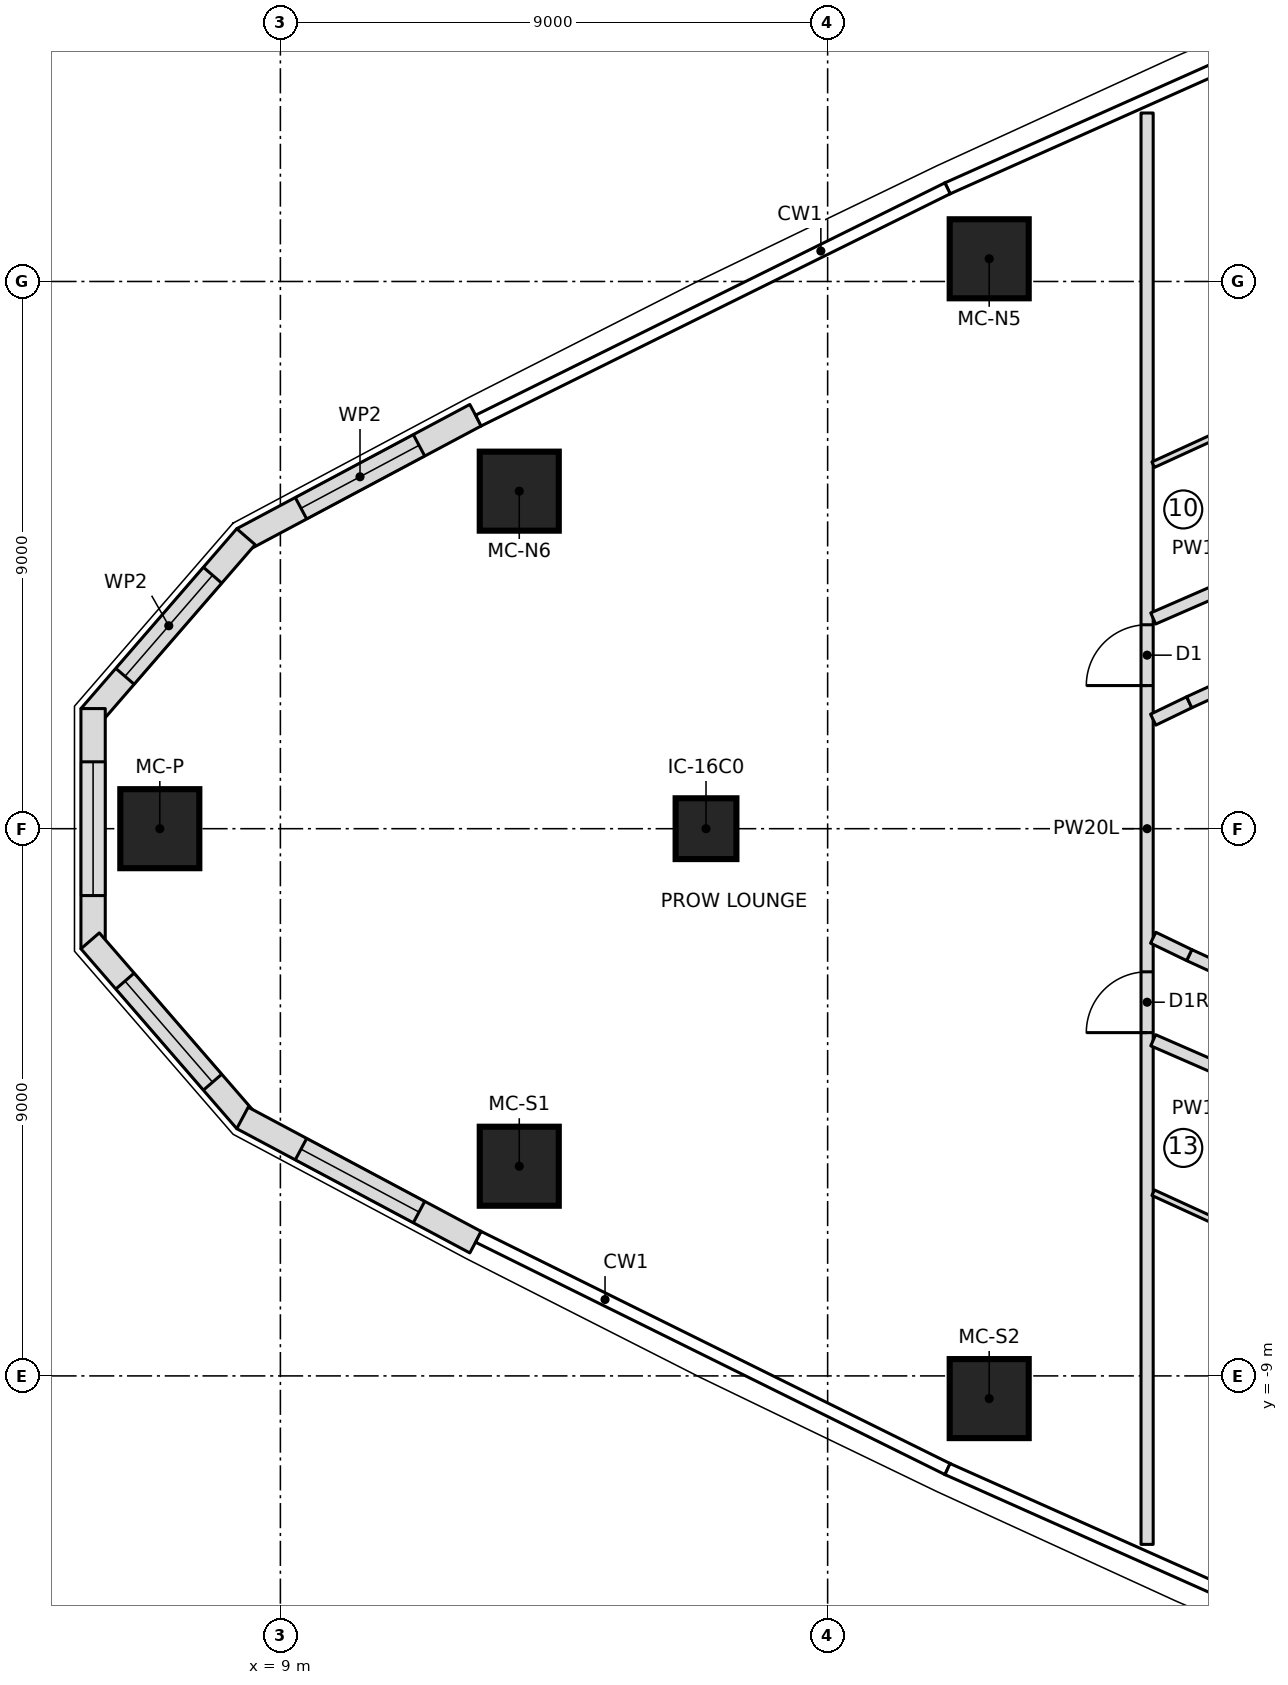
"""IFC4 building model, lengths in metres.
Left out: names, types, materials, properties, quantities, classifications, styles, units other than length and angle.
Written with IfcOpenShell. Run it as: python <this file> out.ifc"""

import sys

from ifc_helpers import new_model, si_unit, direction, frame, frame_2d, origin, origin_2d, place, context, subcontext, project, spatial, polyline, rectangle, outline, extrude, element, fill, save


model = new_model("IFC4")
c1 = context("Model", 3, precision=1e-05, world=origin(), true_north=direction((0.0, 1.0)))
c2 = subcontext(c1, "Body", "Model", "MODEL_VIEW")
j1 = project(units=[si_unit("LENGTHUNIT", "METRE"), si_unit("PLANEANGLEUNIT", "RADIAN")], contexts=[c1])
p1 = place(None, origin())
s1 = spatial("IfcSite", under=j1, at=p1, CompositionType="ELEMENT")
p2 = place(p1, origin())
s2 = spatial("IfcBuilding", under=s1, at=p2, CompositionType="ELEMENT")
p3 = place(p2, frame((0.0, 0.0, 182.6)))
s3 = spatial("IfcBuildingStorey", under=s2, at=p3, CompositionType="ELEMENT", Elevation=182.6)
for number, where, z_axis, x_axis in (
    (1, (7.017, 0.0, 0.0), (0.0, 0.0, 1.0), (1.0, 0.0, 0.0)),
    (2, (12.929, -5.552, 0.0), (0.0, 0.0, 1.0), (1.0, 0.0, 0.0)),
    (3, (20.657, -9.373, 0.0), (0.0, 0.0, 1.0), (1.0, 0.0, 0.0)),
    (4, (20.657, 9.373, 0.0), (0.0, 0.0, 1.0), (1.0, 0.0, 0.0)),
    (5, (12.929, 5.552, 0.0), (0.0, 0.0, 1.0), (1.0, 0.0, 0.0)),
):
    element("IfcColumn", number, at=place(p3, frame(where, z_axis=z_axis, x_axis=x_axis)), inside=s3, PredefinedType="COLUMN", context=c2, shape_type="SweptSolid", body=[
        extrude(rectangle(XDim=1.3, YDim=1.3, at=origin_2d()), origin(), (0.0, 0.0, 1.0), 3.55),
    ])
p4 = place(p3, frame((16.0, 0.0, 0.0), z_axis=(0.0, 0.0, 1.0), x_axis=(1.0, 0.0, 0.0)))
e6 = element("IfcColumn", 6, at=p4, inside=s3, PredefinedType="COLUMN", context=c2, shape_type="SweptSolid", body=[
    extrude(rectangle(XDim=1.0, YDim=1.0, at=origin_2d()), origin(), (0.0, 0.0, 1.0), 3.55),
])
p5 = place(p3, frame((12.21, 6.801, 0.0), z_axis=(0.0, 0.0, 1.0), x_axis=(-0.882385889746, -0.470526451518, 0.0)))
e7 = element("IfcWall", 7, at=p5, inside=s3, PredefinedType="NOTDEFINED", context=c2, shape_type="SweptSolid", body=[
    extrude(outline(polyline([(0.0, -0.2), (4.344, -0.2), (4.27, 0.2), (0.0, 0.2), (0.0, -0.2)])), origin(), (0.0, 0.0, 1.0), 3.25),
])
p6 = place(p5, frame((1.053, 0.0, 0.6)))
e8 = element("IfcOpeningElement", 8, at=p6, cuts=e7, PredefinedType="OPENING", context=c2, shape_type="SweptSolid", body=[
    extrude(outline(polyline([(0.0, 1.35), (0.084, 1.771), (0.322, 2.128), (0.679, 2.366), (1.1, 2.45), (1.521, 2.366), (1.878, 2.128), (2.116, 1.771), (2.2, 1.35), (2.2, 1.1), (2.116, 0.679), (1.878, 0.322), (1.521, 0.084), (1.1, 0.0), (0.679, 0.084), (0.322, 0.322), (0.084, 0.679), (0.0, 1.1), (0.0, 1.35)])), frame((0.0, 0.21, 0.0), z_axis=(0.0, -1.0, 0.0), x_axis=(1.0, 0.0, 0.0)), (0.0, 0.0, 1.0), 0.42),
])
p7 = place(p3, frame((8.409, 4.774, 0.0), z_axis=(0.0, 0.0, 1.0), x_axis=(-0.654759384203, -0.755837382509, 0.0)))
e9 = element("IfcWall", 9, at=p7, inside=s3, PredefinedType="NOTDEFINED", context=c2, shape_type="SweptSolid", body=[
    extrude(outline(polyline([(-0.037, -0.2), (3.876, -0.2), (3.727, 0.2), (0.037, 0.2), (-0.037, -0.2)])), origin(), (0.0, 0.0, 1.0), 3.25),
])
p8 = place(p7, frame((0.801, 0.0, 0.6)))
e10 = element("IfcOpeningElement", 10, at=p8, cuts=e9, PredefinedType="OPENING", context=c2, shape_type="SweptSolid", body=[
    extrude(outline(polyline([(0.0, 1.35), (0.084, 1.771), (0.322, 2.128), (0.679, 2.366), (1.1, 2.45), (1.521, 2.366), (1.878, 2.128), (2.116, 1.771), (2.2, 1.35), (2.2, 1.1), (2.116, 0.679), (1.878, 0.322), (1.521, 0.084), (1.1, 0.0), (0.679, 0.084), (0.322, 0.322), (0.084, 0.679), (0.0, 1.1), (0.0, 1.35)])), frame((0.0, 0.21, 0.0), z_axis=(0.0, -1.0, 0.0), x_axis=(1.0, 0.0, 0.0)), (0.0, 0.0, 1.0), 0.42),
])
p9 = place(p3, frame((5.92, 1.901, 0.0), z_axis=(0.0, 0.0, 1.0), x_axis=(0.0, -1.0, 0.0)))
e11 = element("IfcWall", 11, at=p9, inside=s3, PredefinedType="NOTDEFINED", context=c2, shape_type="SweptSolid", body=[
    extrude(outline(polyline([(-0.075, -0.2), (3.876, -0.2), (3.727, 0.2), (0.075, 0.2), (-0.075, -0.2)])), origin(), (0.0, 0.0, 1.0), 3.25),
])
p10 = place(p9, frame((0.801, 0.0, 0.6)))
e12 = element("IfcOpeningElement", 12, at=p10, cuts=e11, PredefinedType="OPENING", context=c2, shape_type="SweptSolid", body=[
    extrude(outline(polyline([(0.0, 1.35), (0.084, 1.771), (0.322, 2.128), (0.679, 2.366), (1.1, 2.45), (1.521, 2.366), (1.878, 2.128), (2.116, 1.771), (2.2, 1.35), (2.2, 1.1), (2.116, 0.679), (1.878, 0.322), (1.521, 0.084), (1.1, 0.0), (0.679, 0.084), (0.322, 0.322), (0.084, 0.679), (0.0, 1.1), (0.0, 1.35)])), frame((0.0, 0.21, 0.0), z_axis=(0.0, -1.0, 0.0), x_axis=(1.0, 0.0, 0.0)), (0.0, 0.0, 1.0), 0.42),
])
p11 = place(p3, frame((5.92, -1.901, 0.0), z_axis=(0.0, 0.0, 1.0), x_axis=(0.654759384203, -0.755837382509, 0.0)))
e13 = element("IfcWall", 13, at=p11, inside=s3, PredefinedType="NOTDEFINED", context=c2, shape_type="SweptSolid", body=[
    extrude(outline(polyline([(-0.075, -0.2), (3.839, -0.2), (3.765, 0.2), (0.075, 0.2), (-0.075, -0.2)])), origin(), (0.0, 0.0, 1.0), 3.25),
])
p12 = place(p11, frame((0.801, 0.0, 0.6)))
e14 = element("IfcOpeningElement", 14, at=p12, cuts=e13, PredefinedType="OPENING", context=c2, shape_type="SweptSolid", body=[
    extrude(outline(polyline([(0.0, 1.35), (0.084, 1.771), (0.322, 2.128), (0.679, 2.366), (1.1, 2.45), (1.521, 2.366), (1.878, 2.128), (2.116, 1.771), (2.2, 1.35), (2.2, 1.1), (2.116, 0.679), (1.878, 0.322), (1.521, 0.084), (1.1, 0.0), (0.679, 0.084), (0.322, 0.322), (0.084, 0.679), (0.0, 1.1), (0.0, 1.35)])), frame((0.0, 0.21, 0.0), z_axis=(0.0, -1.0, 0.0), x_axis=(1.0, 0.0, 0.0)), (0.0, 0.0, 1.0), 0.42),
])
p13 = place(p3, frame((8.409, -4.774, 0.0), z_axis=(0.0, 0.0, 1.0), x_axis=(0.882385889746, -0.470526451518, 0.0)))
e15 = element("IfcWall", 15, at=p13, inside=s3, PredefinedType="NOTDEFINED", context=c2, shape_type="SweptSolid", body=[
    extrude(outline(polyline([(-0.037, -0.2), (4.307, -0.2), (4.307, 0.2), (0.037, 0.2), (-0.037, -0.2)])), origin(), (0.0, 0.0, 1.0), 3.25),
])
p14 = place(p13, frame((1.053, 0.0, 0.6)))
e16 = element("IfcOpeningElement", 16, at=p14, cuts=e15, PredefinedType="OPENING", context=c2, shape_type="SweptSolid", body=[
    extrude(outline(polyline([(0.0, 1.35), (0.084, 1.771), (0.322, 2.128), (0.679, 2.366), (1.1, 2.45), (1.521, 2.366), (1.878, 2.128), (2.116, 1.771), (2.2, 1.35), (2.2, 1.1), (2.116, 0.679), (1.878, 0.322), (1.521, 0.084), (1.1, 0.0), (0.679, 0.084), (0.322, 0.322), (0.084, 0.679), (0.0, 1.1), (0.0, 1.35)])), frame((0.0, 0.21, 0.0), z_axis=(0.0, -1.0, 0.0), x_axis=(1.0, 0.0, 0.0)), (0.0, 0.0, 1.0), 0.42),
])
p15 = place(p3, frame((23.254, -11.771, 0.0), z_axis=(0.0, 0.0, 1.0), x_axis=(0.0, 1.0, 0.0)))
e17 = element("IfcWall", 17, at=p15, inside=s3, PredefinedType="PARTITIONING", context=c2, shape_type="SweptSolid", body=[
    extrude(rectangle(XDim=23.542, YDim=0.2, at=frame_2d((11.771, 0.0))), origin(), (0.0, 0.0, 1.0), 3.25),
])
p16 = place(p15, frame((14.125, 0.0, 0.0)))
e18 = element("IfcOpeningElement", 18, at=p16, cuts=e17, PredefinedType="OPENING", context=c2, shape_type="SweptSolid", body=[
    extrude(rectangle(XDim=1.0, YDim=2.1, at=frame_2d((0.5, 1.05))), frame((0.0, 0.11, 0.0), z_axis=(0.0, -1.0, 0.0), x_axis=(1.0, 0.0, 0.0)), (0.0, 0.0, 1.0), 0.22),
])
p17 = place(p15, frame((8.417, 0.0, 0.0)))
e19 = element("IfcOpeningElement", 19, at=p17, cuts=e17, PredefinedType="OPENING", context=c2, shape_type="SweptSolid", body=[
    extrude(rectangle(XDim=1.0, YDim=2.1, at=frame_2d((0.5, 1.05))), frame((0.0, 0.11, 0.0), z_axis=(0.0, -1.0, 0.0), x_axis=(1.0, 0.0, 0.0)), (0.0, 0.0, 1.0), 0.22),
])
p18 = place(p3, frame((23.354, 3.458, 0.0), z_axis=(0.0, 0.0, 1.0), x_axis=(0.916719487908, 0.399531451189, 0.0)))
e20 = element("IfcWall", 20, at=p18, inside=s3, PredefinedType="PARTITIONING", context=c2, shape_type="SweptSolid", body=[
    extrude(rectangle(XDim=11.404, YDim=0.2, at=frame_2d((5.702, 0.0))), origin(), (0.0, 0.0, 1.0), 3.25),
])
p19 = place(p18, frame((3.05, 0.0, 0.0)))
e21 = element("IfcOpeningElement", 21, at=p19, cuts=e20, PredefinedType="OPENING", context=c2, shape_type="SweptSolid", body=[
    extrude(rectangle(XDim=1.0, YDim=2.1, at=frame_2d((0.5, 1.05))), frame((0.0, 0.11, 0.0), z_axis=(0.0, -1.0, 0.0), x_axis=(1.0, 0.0, 0.0)), (0.0, 0.0, 1.0), 0.22),
])
p20 = place(p3, frame((23.354, 5.987, 0.0), z_axis=(0.0, 0.0, 1.0), x_axis=(0.909158902999, 0.416449383597, 0.0)))
e22 = element("IfcWall", 22, at=p20, inside=s3, PredefinedType="PARTITIONING", context=c2, shape_type="SweptSolid", body=[
    extrude(rectangle(XDim=1.556, YDim=0.1, at=frame_2d((0.778, 0.0))), origin(), (0.0, 0.0, 1.0), 3.25),
])
p21 = place(p3, frame((23.354, -3.479, 0.0), z_axis=(0.0, 0.0, 1.0), x_axis=(0.916726746983, -0.399514794926, 0.0)))
e23 = element("IfcWall", 23, at=p21, inside=s3, PredefinedType="PARTITIONING", context=c2, shape_type="SweptSolid", body=[
    extrude(rectangle(XDim=11.396, YDim=0.2, at=frame_2d((5.698, 0.0))), origin(), (0.0, 0.0, 1.0), 3.25),
])
p22 = place(p21, frame((3.05, 0.0, 0.0)))
e24 = element("IfcOpeningElement", 24, at=p22, cuts=e23, PredefinedType="OPENING", context=c2, shape_type="SweptSolid", body=[
    extrude(rectangle(XDim=1.0, YDim=2.1, at=frame_2d((0.5, 1.05))), frame((0.0, 0.11, 0.0), z_axis=(0.0, -1.0, 0.0), x_axis=(1.0, 0.0, 0.0)), (0.0, 0.0, 1.0), 0.22),
])
p23 = place(p3, frame((24.769, -6.635, 0.0), z_axis=(0.0, 0.0, 1.0), x_axis=(-0.909158902999, 0.416449383597, 0.0)))
e25 = element("IfcWall", 25, at=p23, inside=s3, PredefinedType="PARTITIONING", context=c2, shape_type="SweptSolid", body=[
    extrude(rectangle(XDim=1.556, YDim=0.1, at=frame_2d((0.778, 0.0))), origin(), (0.0, 0.0, 1.0), 3.25),
])
p24 = place(p3, frame((27.69, -3.793, 0.0), z_axis=(0.0, 0.0, 1.0), x_axis=(-0.909180834404, 0.416401501382, 0.0)))
e26 = element("IfcWall", 26, at=p24, inside=s3, PredefinedType="PARTITIONING", context=c2, shape_type="SweptSolid", body=[
    extrude(rectangle(XDim=4.117, YDim=0.2, at=frame_2d((2.059, 0.0))), origin(), (0.0, 0.0, 1.0), 3.25),
])
p25 = place(p24, frame((1.559, 0.0, 0.0)))
e27 = element("IfcOpeningElement", 27, at=p25, cuts=e26, PredefinedType="OPENING", context=c2, shape_type="SweptSolid", body=[
    extrude(rectangle(XDim=1.0, YDim=2.1, at=frame_2d((0.5, 1.05))), frame((0.0, 0.11, 0.0), z_axis=(0.0, -1.0, 0.0), x_axis=(1.0, 0.0, 0.0)), (0.0, 0.0, 1.0), 0.22),
])
for number, where, z_axis, x_axis in (
    (28, (23.947, -2.079, 0.0), (0.0, 0.0, 1.0), (-0.901, 0.435, 0.0)),
    (29, (23.354, 1.793, 0.0), (0.0, 0.0, 1.0), (0.901, 0.435, 0.0)),
):
    element("IfcWall", number, at=place(p3, frame(where, z_axis=z_axis, x_axis=x_axis)), inside=s3, PredefinedType="PARTITIONING", context=c2, shape_type="SweptSolid", body=[
        extrude(rectangle(XDim=0.658, YDim=0.2, at=frame_2d((0.329, 0.0))), origin(), (0.0, 0.0, 1.0), 3.25),
    ])
p26 = place(p3, frame((23.947, 2.079, 0.0), z_axis=(0.0, 0.0, 1.0), x_axis=(0.909180834404, 0.416401501382, 0.0)))
e30 = element("IfcWall", 30, at=p26, inside=s3, PredefinedType="PARTITIONING", context=c2, shape_type="SweptSolid", body=[
    extrude(rectangle(XDim=4.117, YDim=0.2, at=frame_2d((2.059, 0.0))), origin(), (0.0, 0.0, 1.0), 3.25),
])
p27 = place(p6, origin())
e31 = element("IfcWindow", 31, at=p27, inside=s3, PartitioningType="SINGLE_PANEL", PredefinedType="WINDOW", context=c2, shape_type="SweptSolid", body=[
    extrude(outline(polyline([(0.0, 1.35), (0.084, 1.771), (0.322, 2.128), (0.679, 2.366), (1.1, 2.45), (1.521, 2.366), (1.878, 2.128), (2.116, 1.771), (2.2, 1.35), (2.2, 1.1), (2.116, 0.679), (1.878, 0.322), (1.521, 0.084), (1.1, 0.0), (0.679, 0.084), (0.322, 0.322), (0.084, 0.679), (0.0, 1.1), (0.0, 1.35)])), frame((0.0, 0.17, 0.0), z_axis=(0.0, -1.0, 0.0), x_axis=(1.0, 0.0, 0.0)), (0.0, 0.0, 1.0), 0.06),
])
fill(e8, e31)
p28 = place(p8, origin())
e32 = element("IfcWindow", 32, at=p28, inside=s3, PartitioningType="SINGLE_PANEL", PredefinedType="WINDOW", context=c2, shape_type="SweptSolid", body=[
    extrude(outline(polyline([(0.0, 1.35), (0.084, 1.771), (0.322, 2.128), (0.679, 2.366), (1.1, 2.45), (1.521, 2.366), (1.878, 2.128), (2.116, 1.771), (2.2, 1.35), (2.2, 1.1), (2.116, 0.679), (1.878, 0.322), (1.521, 0.084), (1.1, 0.0), (0.679, 0.084), (0.322, 0.322), (0.084, 0.679), (0.0, 1.1), (0.0, 1.35)])), frame((0.0, 0.17, 0.0), z_axis=(0.0, -1.0, 0.0), x_axis=(1.0, 0.0, 0.0)), (0.0, 0.0, 1.0), 0.06),
])
fill(e10, e32)
p29 = place(p10, origin())
e33 = element("IfcWindow", 33, at=p29, inside=s3, PartitioningType="SINGLE_PANEL", PredefinedType="WINDOW", context=c2, shape_type="SweptSolid", body=[
    extrude(outline(polyline([(0.0, 1.35), (0.084, 1.771), (0.322, 2.128), (0.679, 2.366), (1.1, 2.45), (1.521, 2.366), (1.878, 2.128), (2.116, 1.771), (2.2, 1.35), (2.2, 1.1), (2.116, 0.679), (1.878, 0.322), (1.521, 0.084), (1.1, 0.0), (0.679, 0.084), (0.322, 0.322), (0.084, 0.679), (0.0, 1.1), (0.0, 1.35)])), frame((0.0, 0.17, 0.0), z_axis=(0.0, -1.0, 0.0), x_axis=(1.0, 0.0, 0.0)), (0.0, 0.0, 1.0), 0.06),
])
fill(e12, e33)
p30 = place(p12, origin())
e34 = element("IfcWindow", 34, at=p30, inside=s3, PartitioningType="SINGLE_PANEL", PredefinedType="WINDOW", context=c2, shape_type="SweptSolid", body=[
    extrude(outline(polyline([(0.0, 1.35), (0.084, 1.771), (0.322, 2.128), (0.679, 2.366), (1.1, 2.45), (1.521, 2.366), (1.878, 2.128), (2.116, 1.771), (2.2, 1.35), (2.2, 1.1), (2.116, 0.679), (1.878, 0.322), (1.521, 0.084), (1.1, 0.0), (0.679, 0.084), (0.322, 0.322), (0.084, 0.679), (0.0, 1.1), (0.0, 1.35)])), frame((0.0, 0.17, 0.0), z_axis=(0.0, -1.0, 0.0), x_axis=(1.0, 0.0, 0.0)), (0.0, 0.0, 1.0), 0.06),
])
fill(e14, e34)
p31 = place(p14, origin())
e35 = element("IfcWindow", 35, at=p31, inside=s3, PartitioningType="SINGLE_PANEL", PredefinedType="WINDOW", context=c2, shape_type="SweptSolid", body=[
    extrude(outline(polyline([(0.0, 1.35), (0.084, 1.771), (0.322, 2.128), (0.679, 2.366), (1.1, 2.45), (1.521, 2.366), (1.878, 2.128), (2.116, 1.771), (2.2, 1.35), (2.2, 1.1), (2.116, 0.679), (1.878, 0.322), (1.521, 0.084), (1.1, 0.0), (0.679, 0.084), (0.322, 0.322), (0.084, 0.679), (0.0, 1.1), (0.0, 1.35)])), frame((0.0, 0.17, 0.0), z_axis=(0.0, -1.0, 0.0), x_axis=(1.0, 0.0, 0.0)), (0.0, 0.0, 1.0), 0.06),
])
fill(e16, e35)
p32 = place(p16, origin())
e36 = element("IfcDoor", 36, at=p32, inside=s3, OperationType="SINGLE_SWING_LEFT", PredefinedType="DOOR", context=c2, shape_type="SweptSolid", body=[
    extrude(rectangle(XDim=1.0, YDim=2.1, at=frame_2d((0.5, 1.05))), frame((0.0, 0.025, 0.0), z_axis=(0.0, -1.0, 0.0), x_axis=(1.0, 0.0, 0.0)), (0.0, 0.0, 1.0), 0.05),
])
fill(e18, e36)
p33 = place(p17, origin())
e37 = element("IfcDoor", 37, at=p33, inside=s3, OperationType="SINGLE_SWING_RIGHT", PredefinedType="DOOR", context=c2, shape_type="SweptSolid", body=[
    extrude(rectangle(XDim=1.0, YDim=2.1, at=frame_2d((0.5, 1.05))), frame((0.0, 0.025, 0.0), z_axis=(0.0, -1.0, 0.0), x_axis=(1.0, 0.0, 0.0)), (0.0, 0.0, 1.0), 0.05),
])
fill(e19, e37)
save(model, sys.argv[1])
